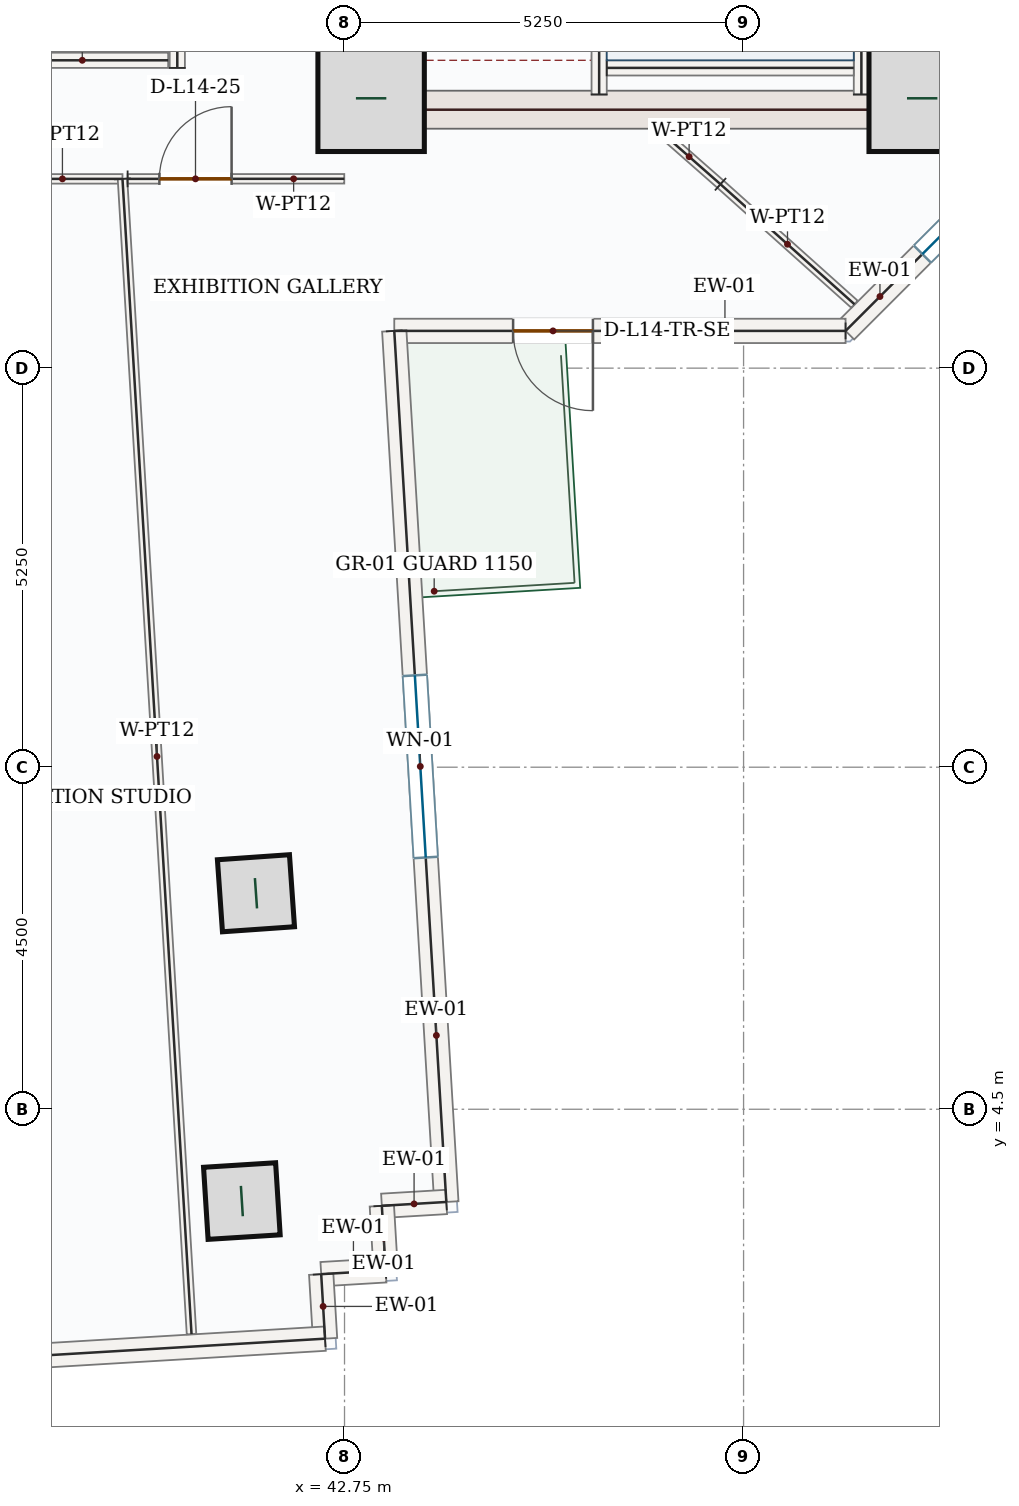
"""IFC4 building model, lengths in metres.
Left out: names, types, materials, properties, quantities, classifications, styles, units other than length and angle.
Written with IfcOpenShell. Run it as: python <this file> out.ifc"""

import sys

from ifc_helpers import new_model, si_unit, direction, frame, frame_2d, origin, origin_2d, place, context, subcontext, project, spatial, rectangle, hollow_rectangle, extrude, source, transform, mapped, element, fill, save


model = new_model("IFC4")
c1 = context("Model", 3, precision=1e-05, world=origin(), true_north=direction((0.0, 1.0)))
c2 = subcontext(c1, "Body", "Model", "MODEL_VIEW")
j1 = project(units=[si_unit("LENGTHUNIT", "METRE"), si_unit("PLANEANGLEUNIT", "RADIAN")], contexts=[c1])
p1 = place(None, origin())
s1 = spatial("IfcSite", under=j1, at=p1, CompositionType="ELEMENT")
p2 = place(p1, origin())
s2 = spatial("IfcBuilding", under=s1, at=p2, CompositionType="ELEMENT")
p3 = place(p2, frame((0.0, 0.0, 66.9)))
s3 = spatial("IfcBuildingStorey", under=s2, at=p3, CompositionType="ELEMENT", Elevation=66.9)
p4 = place(p3, frame((43.0, 17.4, 0.0), z_axis=(0.0, 0.0, 1.0), x_axis=(0.0, 1.0, 0.0)))
e1 = element("IfcWall", 1, at=p4, inside=s3, PredefinedType="SHEAR", context=c2, shape_type="SweptSolid", body=[
    extrude(rectangle(XDim=8.55, YDim=0.5, at=frame_2d((4.275, 0.0))), origin(), (0.0, 0.0, 1.0), 3.95),
])
p5 = place(p4, frame((6.65, 0.0, 0.0)))
e2 = element("IfcOpeningElement", 2, at=p5, cuts=e1, PredefinedType="OPENING", context=c2, shape_type="SweptSolid", body=[
    extrude(rectangle(XDim=1.1, YDim=2.2, at=frame_2d((0.55, 1.1))), frame((0.0, 0.26, 0.0), z_axis=(0.0, -1.0, 0.0), x_axis=(1.0, 0.0, 0.0)), (0.0, 0.0, 1.0), 0.52),
])
p6 = place(p4, frame((1.75, 0.0, 0.0)))
e3 = element("IfcOpeningElement", 3, at=p6, cuts=e1, PredefinedType="OPENING", context=c2, shape_type="SweptSolid", body=[
    extrude(rectangle(XDim=1.3, YDim=2.2, at=frame_2d((0.65, 1.1))), frame((0.0, 0.26, 0.0), z_axis=(0.0, -1.0, 0.0), x_axis=(1.0, 0.0, 0.0)), (0.0, 0.0, 1.0), 0.52),
])
p7 = place(p4, frame((4.55, 0.0, 0.0)))
e4 = element("IfcOpeningElement", 4, at=p7, cuts=e1, PredefinedType="OPENING", context=c2, shape_type="SweptSolid", body=[
    extrude(rectangle(XDim=0.88, YDim=2.1, at=frame_2d((0.44, 1.05))), frame((0.0, 0.26, 0.0), z_axis=(0.0, -1.0, 0.0), x_axis=(1.0, 0.0, 0.0)), (0.0, 0.0, 1.0), 0.52),
])
m1 = source(origin(), c2, "Body", "SweptSolid", [
    extrude(rectangle(XDim=8.55, YDim=0.5, at=frame_2d((4.275, 0.0))), origin(), (0.0, 0.0, 1.0), 3.95),
])
p8 = place(p3, frame((50.5, 17.4, 0.0), z_axis=(0.0, 0.0, 1.0), x_axis=(0.0, 1.0, 0.0)))
e5 = element("IfcWall", 5, at=p8, inside=s3, PredefinedType="SHEAR", context=c2, shape_type="MappedRepresentation", body=[
    mapped(m1, transform((0.0, 0.0, 0.0), x_axis=(1.0, 0.0, 0.0), y_axis=(0.0, 1.0, 0.0), z_axis=(0.0, 0.0, 1.0), scale=1.0)),
])
m2 = source(origin(), c2, "Body", "SweptSolid", [
    extrude(rectangle(XDim=7.0, YDim=0.5, at=frame_2d((3.5, 0.0))), origin(), (0.0, 0.0, 1.0), 3.95),
])
p9 = place(p3, frame((43.25, 17.65, 0.0), z_axis=(0.0, 0.0, 1.0), x_axis=(1.0, 0.0, 0.0)))
e6 = element("IfcWall", 6, at=p9, inside=s3, PredefinedType="SHEAR", context=c2, shape_type="MappedRepresentation", body=[
    mapped(m2, transform((0.0, 0.0, 0.0), x_axis=(1.0, 0.0, 0.0), y_axis=(0.0, 1.0, 0.0), z_axis=(0.0, 0.0, 1.0), scale=1.0)),
])
m3 = source(origin(), c2, "Body", "SweptSolid", [
    extrude(rectangle(XDim=1.4, YDim=1.4, at=origin_2d()), origin(), (0.0, 0.0, 1.0), 4.2),
])
for number, where, z_axis, x_axis in (
    (7, (43.1, 17.8, 0.0), (0.0, 0.0, 1.0), (1.0, 0.0, 0.0)),
    (8, (50.35, 17.8, 0.0), (0.0, 0.0, 1.0), (1.0, 0.0, 0.0)),
):
    element("IfcColumn", number, at=place(p3, frame(where, z_axis=z_axis, x_axis=x_axis)), inside=s3, PredefinedType="COLUMN", context=c2, shape_type="MappedRepresentation", body=[
        mapped(m3, transform((0.0, 0.0, 0.0), x_axis=(1.0, 0.0, 0.0), y_axis=(0.0, 1.0, 0.0), z_axis=(0.0, 0.0, 1.0), scale=1.0)),
    ])
m4 = source(origin(), c2, "Body", "SweptSolid", [
    extrude(hollow_rectangle(XDim=0.95, YDim=0.95, WallThickness=0.05, at=origin_2d()), origin(), (0.0, 0.0, 1.0), 4.2),
])
for number, where, z_axis, x_axis in (
    (9, (41.585, 7.342, 0.0), (0.0, 0.0, 1.0), (-0.07, 0.998, 0.0)),
    (10, (41.399, 3.292, 0.0), (0.0, 0.0, 1.0), (-0.063, 0.998, 0.0)),
):
    element("IfcColumn", number, at=place(p3, frame(where, z_axis=z_axis, x_axis=x_axis)), inside=s3, PredefinedType="COLUMN", context=c2, shape_type="MappedRepresentation", body=[
        mapped(m4, transform((0.0, 0.0, 0.0), x_axis=(1.0, 0.0, 0.0), y_axis=(0.0, 1.0, 0.0), z_axis=(0.0, 0.0, 1.0), scale=1.0)),
    ])
p10 = place(p3, frame((53.06, 18.458, 0.0), z_axis=(0.0, 0.0, 1.0), x_axis=(-0.707106781187, -0.707106781187, 0.0)))
e11 = element("IfcWall", 11, at=p10, inside=s3, PredefinedType="SOLIDWALL", context=c2, shape_type="SweptSolid", body=[
    extrude(rectangle(XDim=5.258, YDim=0.32, at=frame_2d((2.629, 0.0))), origin(), (0.0, 0.0, 1.0), 3.95),
])
p11 = place(p10, frame((1.429, 0.0, 0.85)))
e12 = element("IfcOpeningElement", 12, at=p11, cuts=e11, PredefinedType="OPENING", context=c2, shape_type="SweptSolid", body=[
    extrude(rectangle(XDim=2.4, YDim=1.8, at=frame_2d((1.2, 0.9))), frame((0.0, 0.17, 0.0), z_axis=(0.0, -1.0, 0.0), x_axis=(1.0, 0.0, 0.0)), (0.0, 0.0, 1.0), 0.34),
])
p12 = place(p3, frame((49.342, 14.74, 0.0), z_axis=(0.0, 0.0, 1.0), x_axis=(-1.0, 0.0, 0.0)))
e13 = element("IfcWall", 13, at=p12, inside=s3, PredefinedType="SOLIDWALL", context=c2, shape_type="SweptSolid", body=[
    extrude(rectangle(XDim=5.938, YDim=0.32, at=frame_2d((2.969, 0.0))), origin(), (0.0, 0.0, 1.0), 3.95),
])
p13 = place(p12, frame((3.324, 0.0, 0.0)))
e14 = element("IfcOpeningElement", 14, at=p13, cuts=e13, PredefinedType="OPENING", context=c2, shape_type="SweptSolid", body=[
    extrude(rectangle(XDim=1.05, YDim=2.15, at=frame_2d((0.525, 1.075))), frame((0.0, 0.17, 0.0), z_axis=(0.0, -1.0, 0.0), x_axis=(1.0, 0.0, 0.0)), (0.0, 0.0, 1.0), 0.34),
])
p14 = place(p3, frame((43.405, 14.74, 0.0), z_axis=(0.0, 0.0, 1.0), x_axis=(0.059651994121, -0.998219234235, 0.0)))
e15 = element("IfcWall", 15, at=p14, inside=s3, PredefinedType="SOLIDWALL", context=c2, shape_type="SweptSolid", body=[
    extrude(rectangle(XDim=11.48, YDim=0.32, at=frame_2d((5.74, 0.0))), origin(), (0.0, 0.0, 1.0), 3.95),
])
p15 = place(p14, frame((4.54, 0.0, 0.85)))
e16 = element("IfcOpeningElement", 16, at=p15, cuts=e15, PredefinedType="OPENING", context=c2, shape_type="SweptSolid", body=[
    extrude(rectangle(XDim=2.4, YDim=1.8, at=frame_2d((1.2, 0.9))), frame((0.0, 0.17, 0.0), z_axis=(0.0, -1.0, 0.0), x_axis=(1.0, 0.0, 0.0)), (0.0, 0.0, 1.0), 0.34),
])
m5 = source(origin(), c2, "Body", "SweptSolid", [
    extrude(rectangle(XDim=0.85, YDim=0.32, at=frame_2d((0.425, 0.0))), origin(), (0.0, 0.0, 1.0), 3.95),
])
for number, where, z_axis, x_axis in (
    (17, (44.089, 3.28, 0.0), (0.0, 0.0, 1.0), (-0.998, -0.06, 0.0)),
    (18, (43.241, 3.229, 0.0), (0.0, 0.0, 1.0), (0.059, -0.998, 0.0)),
    (19, (43.292, 2.381, 0.0), (0.0, 0.0, 1.0), (-0.998, -0.06, 0.0)),
    (20, (42.443, 2.33, 0.0), (0.0, 0.0, 1.0), (0.06, -0.998, 0.0)),
):
    element("IfcWall", number, at=place(p3, frame(where, z_axis=z_axis, x_axis=x_axis)), inside=s3, PredefinedType="SOLIDWALL", context=c2, shape_type="MappedRepresentation", body=[
        mapped(m5, transform((0.0, 0.0, 0.0), x_axis=(1.0, 0.0, 0.0), y_axis=(0.0, 1.0, 0.0), z_axis=(0.0, 0.0, 1.0), scale=1.0)),
    ])
m6 = source(origin(), c2, "Body", "SweptSolid", [
    extrude(rectangle(XDim=9.92, YDim=0.32, at=frame_2d((4.96, 0.0))), origin(), (0.0, 0.0, 1.0), 3.95),
])
p16 = place(p3, frame((42.494, 1.482, 0.0), z_axis=(0.0, 0.0, 1.0), x_axis=(-0.998218942745, -0.059656871726, 0.0)))
e21 = element("IfcWall", 21, at=p16, inside=s3, PredefinedType="SOLIDWALL", context=c2, shape_type="MappedRepresentation", body=[
    mapped(m6, transform((0.0, 0.0, 0.0), x_axis=(1.0, 0.0, 0.0), y_axis=(0.0, 1.0, 0.0), z_axis=(0.0, 0.0, 1.0), scale=1.0)),
])
m7 = source(origin(), c2, "Body", "SweptSolid", [
    extrude(rectangle(XDim=7.87, YDim=0.2, at=frame_2d((3.935, 0.0))), origin(), (0.0, 0.0, 1.0), 3.95),
])
p17 = place(p3, frame((49.55, 17.85, 0.0), z_axis=(0.0, 0.0, 1.0), x_axis=(0.0, 1.0, 0.0)))
e22 = element("IfcWall", 22, at=p17, inside=s3, PredefinedType="SOLIDWALL", context=c2, shape_type="MappedRepresentation", body=[
    mapped(m7, transform((0.0, 0.0, 0.0), x_axis=(1.0, 0.0, 0.0), y_axis=(0.0, 1.0, 0.0), z_axis=(0.0, 0.0, 1.0), scale=1.0)),
])
p18 = place(p3, frame((46.1, 17.85, 0.0), z_axis=(0.0, 0.0, 1.0), x_axis=(0.0, 1.0, 0.0)))
e23 = element("IfcWall", 23, at=p18, inside=s3, PredefinedType="SOLIDWALL", context=c2, shape_type="SweptSolid", body=[
    extrude(rectangle(XDim=8.0, YDim=0.2, at=frame_2d((4.0, 0.0))), origin(), (0.0, 0.0, 1.0), 3.95),
])
p19 = place(p18, frame((6.3, 0.0, 0.0)))
e24 = element("IfcOpeningElement", 24, at=p19, cuts=e23, PredefinedType="OPENING", context=c2, shape_type="SweptSolid", body=[
    extrude(rectangle(XDim=1.05, YDim=2.15, at=frame_2d((0.525, 1.075))), frame((0.0, 0.11, 0.0), z_axis=(0.0, -1.0, 0.0), x_axis=(1.0, 0.0, 0.0)), (0.0, 0.0, 1.0), 0.22),
])
m8 = source(origin(), c2, "Body", "SweptSolid", [
    extrude(rectangle(XDim=3.25, YDim=0.2, at=frame_2d((1.625, 0.0))), origin(), (0.0, 0.0, 1.0), 3.95),
])
p20 = place(p3, frame((46.2, 18.2, 0.0), z_axis=(0.0, 0.0, 1.0), x_axis=(1.0, 0.0, 0.0)))
e25 = element("IfcWall", 25, at=p20, inside=s3, PredefinedType="SOLIDWALL", context=c2, shape_type="MappedRepresentation", body=[
    mapped(m8, transform((0.0, 0.0, 0.0), x_axis=(1.0, 0.0, 0.0), y_axis=(0.0, 1.0, 0.0), z_axis=(0.0, 0.0, 1.0), scale=1.0)),
])
m9 = source(origin(), c2, "Body", "SweptSolid", [
    extrude(rectangle(XDim=2.35, YDim=0.2, at=frame_2d((1.175, 0.0))), origin(), (0.0, 0.0, 1.0), 3.95),
])
p21 = place(p3, frame((40.55, 18.2, 0.0), z_axis=(0.0, 0.0, 1.0), x_axis=(0.0, 1.0, 0.0)))
e26 = element("IfcWall", 26, at=p21, inside=s3, PredefinedType="SOLIDWALL", context=c2, shape_type="MappedRepresentation", body=[
    mapped(m9, transform((0.0, 0.0, 0.0), x_axis=(1.0, 0.0, 0.0), y_axis=(0.0, 1.0, 0.0), z_axis=(0.0, 0.0, 1.0), scale=1.0)),
])
m10 = source(origin(), c2, "Body", "SweptSolid", [
    extrude(rectangle(XDim=2.26, YDim=0.2, at=frame_2d((1.13, 0.0))), origin(), (0.0, 0.0, 1.0), 3.95),
])
p22 = place(p3, frame((38.17, 18.3, 0.0), z_axis=(0.0, 0.0, 1.0), x_axis=(1.0, 0.0, 0.0)))
e27 = element("IfcWall", 27, at=p22, inside=s3, PredefinedType="SOLIDWALL", context=c2, shape_type="MappedRepresentation", body=[
    mapped(m10, transform((0.0, 0.0, 0.0), x_axis=(1.0, 0.0, 0.0), y_axis=(0.0, 1.0, 0.0), z_axis=(0.0, 0.0, 1.0), scale=1.0)),
])
p23 = place(p3, frame((36.661, 16.74, 0.0), z_axis=(0.0, 0.0, 1.0), x_axis=(1.0, 0.0, 0.0)))
e28 = element("IfcWall", 28, at=p23, inside=s3, PredefinedType="PARTITIONING", context=c2, shape_type="SweptSolid", body=[
    extrude(rectangle(XDim=3.168, YDim=0.125, at=frame_2d((1.584, 0.0))), origin(), (0.0, 0.0, 1.0), 3.95),
])
p24 = place(p23, frame((0.488, 0.0, 0.0)))
e29 = element("IfcOpeningElement", 29, at=p24, cuts=e28, PredefinedType="OPENING", context=c2, shape_type="SweptSolid", body=[
    extrude(rectangle(XDim=0.95, YDim=2.15, at=frame_2d((0.475, 1.075))), frame((0.0, 0.073, 0.0), z_axis=(0.0, -1.0, 0.0), x_axis=(1.0, 0.0, 0.0)), (0.0, 0.0, 1.0), 0.145),
])
m11 = source(origin(), c2, "Body", "SweptSolid", [
    extrude(rectangle(XDim=15.225, YDim=0.125, at=frame_2d((7.612, 0.0))), origin(), (0.0, 0.0, 1.0), 3.95),
])
p25 = place(p3, frame((39.829, 16.74, 0.0), z_axis=(0.0, 0.0, 1.0), x_axis=(0.059652617074, -0.998219197008, 0.0)))
e30 = element("IfcWall", 30, at=p25, inside=s3, PredefinedType="PARTITIONING", context=c2, shape_type="MappedRepresentation", body=[
    mapped(m11, transform((0.0, 0.0, 0.0), x_axis=(1.0, 0.0, 0.0), y_axis=(0.0, 1.0, 0.0), z_axis=(0.0, 0.0, 1.0), scale=1.0)),
])
p26 = place(p3, frame((39.896, 16.74, 0.0), z_axis=(0.0, 0.0, 1.0), x_axis=(0.999999908279, 0.000428302171, 0.0)))
e31 = element("IfcWall", 31, at=p26, inside=s3, PredefinedType="PARTITIONING", context=c2, shape_type="SweptSolid", body=[
    extrude(rectangle(XDim=2.85, YDim=0.125, at=frame_2d((1.425, 0.0))), origin(), (0.0, 0.0, 1.0), 3.95),
])
p27 = place(p26, frame((0.418, 0.0, 0.0)))
e32 = element("IfcOpeningElement", 32, at=p27, cuts=e31, PredefinedType="OPENING", context=c2, shape_type="SweptSolid", body=[
    extrude(rectangle(XDim=0.95, YDim=2.15, at=frame_2d((0.475, 1.075))), frame((0.0, 0.073, 0.0), z_axis=(0.0, -1.0, 0.0), x_axis=(1.0, 0.0, 0.0)), (0.0, 0.0, 1.0), 0.145),
])
m12 = source(origin(), c2, "Body", "SweptSolid", [
    extrude(rectangle(XDim=1.099, YDim=0.125, at=frame_2d((0.549, 0.0))), origin(), (0.0, 0.0, 1.0), 3.95),
])
p28 = place(p3, frame((46.871, 17.395, 0.0), z_axis=(0.0, 0.0, 1.0), x_axis=(0.750977912422, -0.660327324177, 0.0)))
e33 = element("IfcWall", 33, at=p28, inside=s3, PredefinedType="PARTITIONING", context=c2, shape_type="MappedRepresentation", body=[
    mapped(m12, transform((0.0, 0.0, 0.0), x_axis=(1.0, 0.0, 0.0), y_axis=(0.0, 1.0, 0.0), z_axis=(0.0, 0.0, 1.0), scale=1.0)),
])
m13 = source(origin(), c2, "Body", "SweptSolid", [
    extrude(rectangle(XDim=2.367, YDim=0.125, at=frame_2d((1.183, 0.0))), origin(), (0.0, 0.0, 1.0), 3.95),
])
p29 = place(p3, frame((47.696, 16.669, 0.0), z_axis=(0.0, 0.0, 1.0), x_axis=(0.744928255706, -0.667144582419, 0.0)))
e34 = element("IfcWall", 34, at=p29, inside=s3, PredefinedType="PARTITIONING", context=c2, shape_type="MappedRepresentation", body=[
    mapped(m13, transform((0.0, 0.0, 0.0), x_axis=(1.0, 0.0, 0.0), y_axis=(0.0, 1.0, 0.0), z_axis=(0.0, 0.0, 1.0), scale=1.0)),
])
m14 = source(origin(), c2, "Body", "SweptSolid", [
    extrude(rectangle(XDim=2.4, YDim=1.8, at=frame_2d((1.2, 0.9))), frame((0.0, 0.03, 0.0), z_axis=(0.0, -1.0, 0.0), x_axis=(1.0, 0.0, 0.0)), (0.0, 0.0, 1.0), 0.06),
])
p30 = place(p11, origin())
e35 = element("IfcWindow", 35, at=p30, inside=s3, PartitioningType="DOUBLE_PANEL_VERTICAL", PredefinedType="WINDOW", context=c2, shape_type="MappedRepresentation", body=[
    mapped(m14, transform((0.0, 0.0, 0.0), x_axis=(1.0, 0.0, 0.0), y_axis=(0.0, 1.0, 0.0), z_axis=(0.0, 0.0, 1.0), scale=1.0)),
])
fill(e12, e35)
m15 = source(origin(), c2, "Body", "SweptSolid", [
    extrude(rectangle(XDim=1.05, YDim=2.15, at=frame_2d((0.525, 1.075))), frame((0.0, 0.025, 0.0), z_axis=(0.0, -1.0, 0.0), x_axis=(1.0, 0.0, 0.0)), (0.0, 0.0, 1.0), 0.05),
])
p31 = place(p13, origin())
e36 = element("IfcDoor", 36, at=p31, inside=s3, OperationType="SINGLE_SWING_LEFT", PredefinedType="DOOR", context=c2, shape_type="MappedRepresentation", body=[
    mapped(m15, transform((0.0, 0.0, 0.0), x_axis=(1.0, 0.0, 0.0), y_axis=(0.0, 1.0, 0.0), z_axis=(0.0, 0.0, 1.0), scale=1.0)),
])
fill(e14, e36)
p32 = place(p15, origin())
e37 = element("IfcWindow", 37, at=p32, inside=s3, PartitioningType="DOUBLE_PANEL_VERTICAL", PredefinedType="WINDOW", context=c2, shape_type="MappedRepresentation", body=[
    mapped(m14, transform((0.0, 0.0, 0.0), x_axis=(1.0, 0.0, 0.0), y_axis=(0.0, 1.0, 0.0), z_axis=(0.0, 0.0, 1.0), scale=1.0)),
])
fill(e16, e37)
m16 = source(origin(), c2, "Body", "SweptSolid", [
    extrude(rectangle(XDim=0.95, YDim=2.15, at=frame_2d((0.475, 1.075))), frame((0.0, 0.025, 0.0), z_axis=(0.0, -1.0, 0.0), x_axis=(1.0, 0.0, 0.0)), (0.0, 0.0, 1.0), 0.05),
])
p33 = place(p27, origin())
e38 = element("IfcDoor", 38, at=p33, inside=s3, OperationType="SINGLE_SWING_RIGHT", PredefinedType="DOOR", context=c2, shape_type="MappedRepresentation", body=[
    mapped(m16, transform((0.0, 0.0, 0.0), x_axis=(1.0, 0.0, 0.0), y_axis=(0.0, 1.0, 0.0), z_axis=(0.0, 0.0, 1.0), scale=1.0)),
])
fill(e32, e38)
save(model, sys.argv[1])
